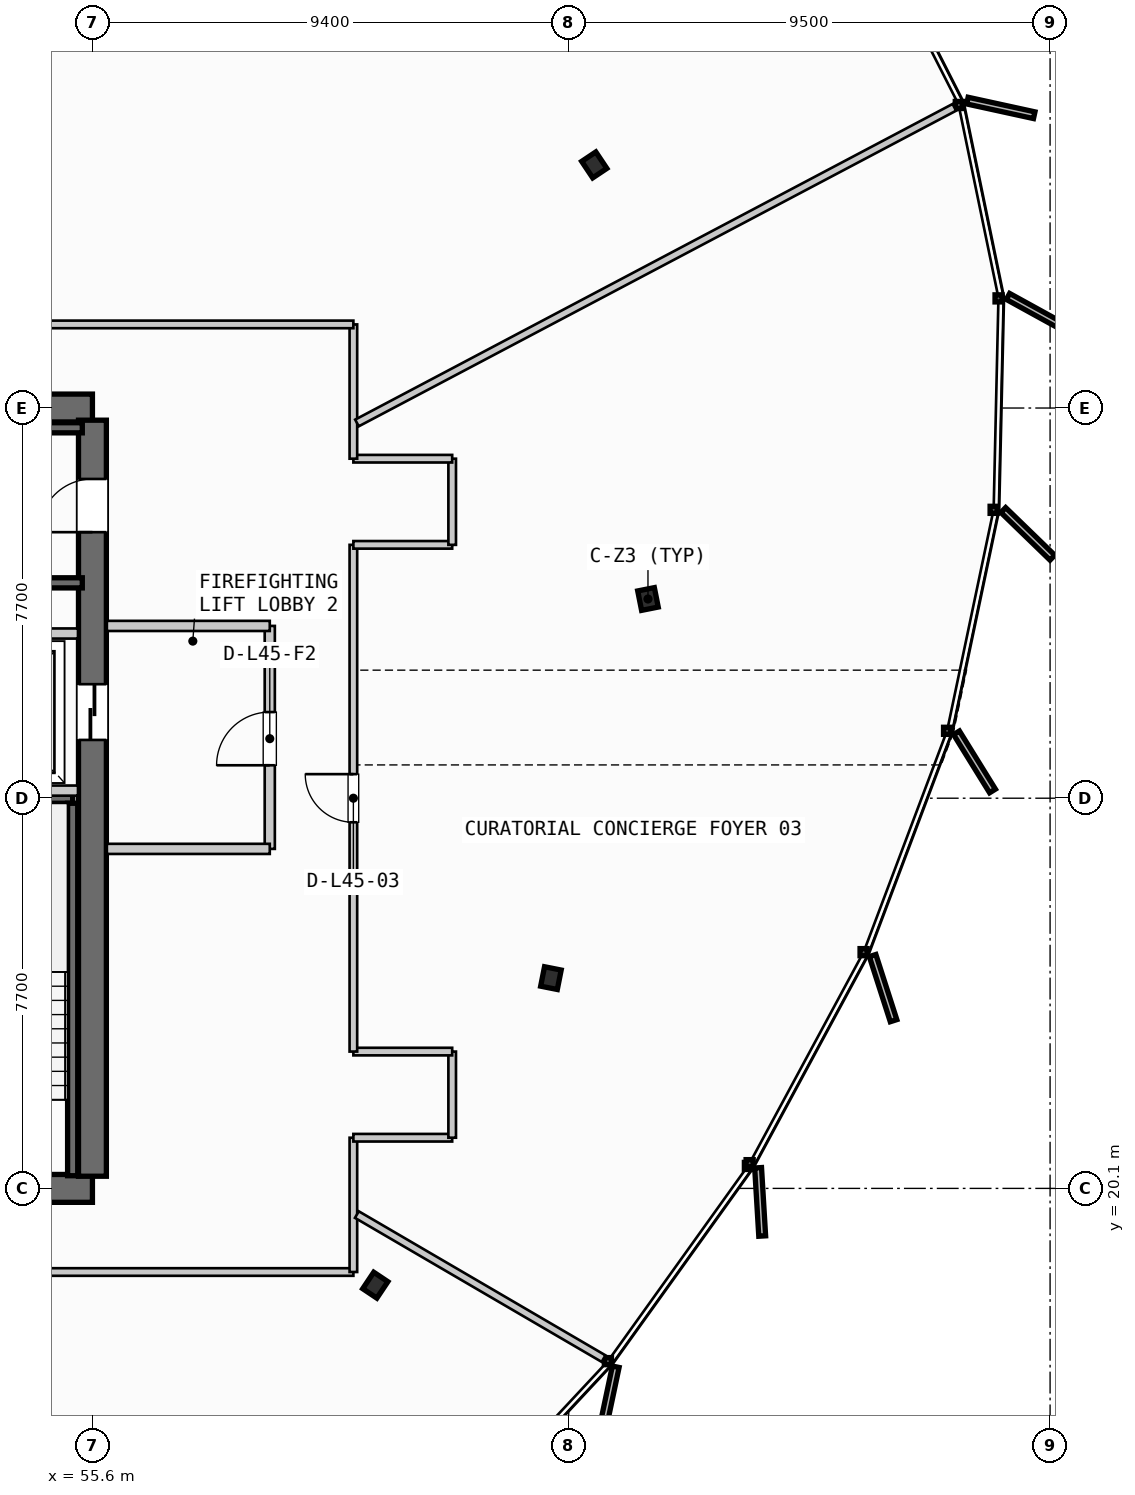
"""IFC4 building model, lengths in metres.
Left out: names, types, materials, properties, quantities, classifications, styles, units other than length and angle.
Written with IfcOpenShell. Run it as: python <this file> out.ifc"""

import sys

from ifc_helpers import new_model, si_unit, direction, frame, frame_2d, origin, origin_2d, place, context, subcontext, project, spatial, rectangle, i_section, extrude, source, transform, mapped, element, fill, save


model = new_model("IFC4")
c1 = context("Model", 3, precision=1e-05, world=origin(), true_north=direction((0.0, 1.0)))
c2 = subcontext(c1, "Body", "Model", "MODEL_VIEW")
j1 = project(units=[si_unit("LENGTHUNIT", "METRE"), si_unit("PLANEANGLEUNIT", "RADIAN")], contexts=[c1])
p1 = place(None, origin())
s1 = spatial("IfcSite", under=j1, at=p1, CompositionType="ELEMENT")
p2 = place(p1, origin())
s2 = spatial("IfcBuilding", under=s1, at=p2, CompositionType="ELEMENT")
p3 = place(p2, frame((0.0, 0.0, 176.4)))
s3 = spatial("IfcBuildingStorey", under=s2, at=p3, CompositionType="ELEMENT", Elevation=176.4)
p4 = place(p3, frame((38.0, 20.1, 0.0), z_axis=(0.0, 0.0, 1.0), x_axis=(1.0, 0.0, 0.0)))
e1 = element("IfcWall", 1, at=p4, inside=s3, PredefinedType="SHEAR", context=c2, shape_type="SweptSolid", body=[
    extrude(rectangle(XDim=17.6, YDim=0.55, at=frame_2d((8.8, 0.0))), origin(), (0.0, 0.0, 1.0), 3.26),
])
p5 = place(p4, frame((1.4, 0.0, 0.0)))
e2 = element("IfcOpeningElement", 2, at=p5, cuts=e1, PredefinedType="OPENING", context=c2, shape_type="SweptSolid", body=[
    extrude(rectangle(XDim=1.05, YDim=2.15, at=frame_2d((0.525, 1.075))), frame((0.0, 0.285, 0.0), z_axis=(0.0, -1.0, 0.0), x_axis=(1.0, 0.0, 0.0)), (0.0, 0.0, 1.0), 0.57),
])
p6 = place(p4, frame((15.15, 0.0, 0.0)))
e3 = element("IfcOpeningElement", 3, at=p6, cuts=e1, PredefinedType="OPENING", context=c2, shape_type="SweptSolid", body=[
    extrude(rectangle(XDim=1.05, YDim=2.15, at=frame_2d((0.525, 1.075))), frame((0.0, 0.285, 0.0), z_axis=(0.0, -1.0, 0.0), x_axis=(1.0, 0.0, 0.0)), (0.0, 0.0, 1.0), 0.57),
])
p7 = place(p4, frame((5.25, 0.0, 0.0)))
e4 = element("IfcOpeningElement", 4, at=p7, cuts=e1, PredefinedType="OPENING", context=c2, shape_type="SweptSolid", body=[
    extrude(rectangle(XDim=0.9, YDim=2.15, at=frame_2d((0.45, 1.075))), frame((0.0, 0.285, 0.0), z_axis=(0.0, -1.0, 0.0), x_axis=(1.0, 0.0, 0.0)), (0.0, 0.0, 1.0), 0.57),
])
p8 = place(p4, frame((11.4, 0.0, 0.0)))
e5 = element("IfcOpeningElement", 5, at=p8, cuts=e1, PredefinedType="OPENING", context=c2, shape_type="SweptSolid", body=[
    extrude(rectangle(XDim=0.95, YDim=2.15, at=frame_2d((0.475, 1.075))), frame((0.0, 0.285, 0.0), z_axis=(0.0, -1.0, 0.0), x_axis=(1.0, 0.0, 0.0)), (0.0, 0.0, 1.0), 0.57),
])
p9 = place(p3, frame((55.6, 35.5, 0.0), z_axis=(0.0, 0.0, 1.0), x_axis=(-1.0, 0.0, 0.0)))
e6 = element("IfcWall", 6, at=p9, inside=s3, PredefinedType="SHEAR", context=c2, shape_type="SweptSolid", body=[
    extrude(rectangle(XDim=17.6, YDim=0.55, at=frame_2d((8.8, 0.0))), origin(), (0.0, 0.0, 1.0), 3.26),
])
p10 = place(p9, frame((8.05, 0.0, 0.0)))
e7 = element("IfcOpeningElement", 7, at=p10, cuts=e6, PredefinedType="OPENING", context=c2, shape_type="SweptSolid", body=[
    extrude(rectangle(XDim=1.5, YDim=2.2, at=frame_2d((0.75, 1.1))), frame((0.0, 0.285, 0.0), z_axis=(0.0, -1.0, 0.0), x_axis=(1.0, 0.0, 0.0)), (0.0, 0.0, 1.0), 0.57),
])
p11 = place(p9, frame((15.1, 0.0, 0.0)))
e8 = element("IfcOpeningElement", 8, at=p11, cuts=e6, PredefinedType="OPENING", context=c2, shape_type="SweptSolid", body=[
    extrude(rectangle(XDim=0.95, YDim=2.15, at=frame_2d((0.475, 1.075))), frame((0.0, 0.285, 0.0), z_axis=(0.0, -1.0, 0.0), x_axis=(1.0, 0.0, 0.0)), (0.0, 0.0, 1.0), 0.57),
])
p12 = place(p9, frame((12.9, 0.0, 0.0)))
e9 = element("IfcOpeningElement", 9, at=p12, cuts=e6, PredefinedType="OPENING", context=c2, shape_type="SweptSolid", body=[
    extrude(rectangle(XDim=0.9, YDim=2.15, at=frame_2d((0.45, 1.075))), frame((0.0, 0.285, 0.0), z_axis=(0.0, -1.0, 0.0), x_axis=(1.0, 0.0, 0.0)), (0.0, 0.0, 1.0), 0.57),
])
p13 = place(p9, frame((10.6, 0.0, 0.0)))
e10 = element("IfcOpeningElement", 10, at=p13, cuts=e6, PredefinedType="OPENING", context=c2, shape_type="SweptSolid", body=[
    extrude(rectangle(XDim=0.95, YDim=2.15, at=frame_2d((0.475, 1.075))), frame((0.0, 0.285, 0.0), z_axis=(0.0, -1.0, 0.0), x_axis=(1.0, 0.0, 0.0)), (0.0, 0.0, 1.0), 0.57),
])
p14 = place(p3, frame((55.6, 20.34, 0.0), z_axis=(0.0, 0.0, 1.0), x_axis=(0.0, 1.0, 0.0)))
e11 = element("IfcWall", 11, at=p14, inside=s3, PredefinedType="SHEAR", context=c2, shape_type="SweptSolid", body=[
    extrude(rectangle(XDim=14.92, YDim=0.55, at=frame_2d((7.46, 0.0))), origin(), (0.0, 0.0, 1.0), 3.26),
])
p15 = place(p14, frame((12.71, 0.0, 0.0)))
e12 = element("IfcOpeningElement", 12, at=p15, cuts=e11, PredefinedType="OPENING", context=c2, shape_type="SweptSolid", body=[
    extrude(rectangle(XDim=1.05, YDim=2.15, at=frame_2d((0.525, 1.075))), frame((0.0, 0.285, 0.0), z_axis=(0.0, -1.0, 0.0), x_axis=(1.0, 0.0, 0.0)), (0.0, 0.0, 1.0), 0.57),
])
p16 = place(p14, frame((8.61, 0.0, 0.0)))
e13 = element("IfcOpeningElement", 13, at=p16, cuts=e11, PredefinedType="OPENING", context=c2, shape_type="SweptSolid", body=[
    extrude(rectangle(XDim=1.1, YDim=2.2, at=frame_2d((0.55, 1.1))), frame((0.0, 0.285, 0.0), z_axis=(0.0, -1.0, 0.0), x_axis=(1.0, 0.0, 0.0)), (0.0, 0.0, 1.0), 0.57),
])
m1 = source(origin(), c2, "Body", "SweptSolid", [
    extrude(i_section(OverallWidth=0.391, OverallDepth=0.335, WebThickness=0.023, FlangeThickness=0.034, FilletRadius=0.015, at=origin_2d()), origin(), (0.0, 0.0, 1.0), 3.26),
])
for number, where, z_axis, x_axis in (
    (14, (66.564, 31.731, 0.0), (0.0, 0.0, 1.0), (0.981, 0.195, 0.0)),
    (15, (65.504, 40.298, 0.0), (0.0, 0.0, 1.0), (0.831, 0.556, 0.0)),
    (16, (61.183, 18.19, 0.0), (0.0, 0.0, 1.0), (0.831, -0.556, 0.0)),
    (17, (64.649, 24.25, 0.0), (0.0, 0.0, 1.0), (0.981, -0.195, 0.0)),
):
    element("IfcColumn", number, at=place(p3, frame(where, z_axis=z_axis, x_axis=x_axis)), inside=s3, PredefinedType="COLUMN", context=c2, shape_type="MappedRepresentation", body=[
        mapped(m1, transform((0.0, 0.0, 0.0), scale=1.0)),
    ])
p17 = place(p3, frame((52.15, 27.8, 0.0), z_axis=(0.0, 0.0, 1.0), x_axis=(1.0, 0.0, 0.0)))
e18 = element("IfcWall", 18, at=p17, inside=s3, PredefinedType="SHEAR", context=c2, shape_type="SweptSolid", body=[
    extrude(rectangle(XDim=3.06, YDim=0.2, at=frame_2d((1.53, 0.0))), origin(), (0.0, 0.0, 1.0), 3.26),
])
for number, where, z_axis, x_axis in (
    (19, (55.21, 27.7, 0.0), (0.0, 0.0, 1.0), (0.0, -1.0, 0.0)),
    (20, (48.05, 35.11, 0.0), (0.0, 0.0, 1.0), (1.0, 0.0, 0.0)),
    (21, (55.4, 32.05, 0.0), (0.0, 0.0, 1.0), (-1.0, 0.0, 0.0)),
):
    element("IfcWall", number, at=place(p3, frame(where, z_axis=z_axis, x_axis=x_axis)), inside=s3, PredefinedType="SHEAR", context=c2, shape_type="SweptSolid", body=[
        extrude(rectangle(XDim=7.35, YDim=0.2, at=frame_2d((3.675, 0.0))), origin(), (0.0, 0.0, 1.0), 3.26),
    ])
for number, where, z_axis, x_axis in (
    (22, (52.45, 27.95, 0.0), (0.0, 0.0, 1.0), (1.0, 0.0, 0.0)),
    (23, (52.45, 31.05, 0.0), (0.0, 0.0, 1.0), (1.0, 0.0, 0.0)),
):
    element("IfcWall", number, at=place(p3, frame(where, z_axis=z_axis, x_axis=x_axis)), inside=s3, PredefinedType="PARTITIONING", context=c2, shape_type="SweptSolid", body=[
        extrude(rectangle(XDim=2.865, YDim=0.2, at=frame_2d((1.433, 0.0))), origin(), (0.0, 0.0, 1.0), 2.28),
    ])
p18 = place(p3, frame((59.1, 26.8, 0.0), z_axis=(0.0, 0.0, 1.0), x_axis=(0.0, 1.0, 0.0)))
e24 = element("IfcWall", 24, at=p18, inside=s3, PredefinedType="PARTITIONING", context=c2, shape_type="SweptSolid", body=[
    extrude(rectangle(XDim=4.4, YDim=0.2, at=frame_2d((2.2, 0.0))), origin(), (0.0, 0.0, 1.0), 2.28),
])
p19 = place(p18, frame((1.65, 0.0, 0.0)))
e25 = element("IfcOpeningElement", 25, at=p19, cuts=e24, PredefinedType="OPENING", context=c2, shape_type="SweptSolid", body=[
    extrude(rectangle(XDim=1.05, YDim=2.15, at=frame_2d((0.525, 1.075))), frame((0.0, 0.11, 0.0), z_axis=(0.0, -1.0, 0.0), x_axis=(1.0, 0.0, 0.0)), (0.0, 0.0, 1.0), 0.22),
])
for number, where, z_axis, x_axis in (
    (26, (55.885, 26.8, 0.0), (0.0, 0.0, 1.0), (1.0, 0.0, 0.0)),
    (27, (55.885, 31.2, 0.0), (0.0, 0.0, 1.0), (1.0, 0.0, 0.0)),
):
    element("IfcWall", number, at=place(p3, frame(where, z_axis=z_axis, x_axis=x_axis)), inside=s3, PredefinedType="PARTITIONING", context=c2, shape_type="SweptSolid", body=[
        extrude(rectangle(XDim=3.215, YDim=0.2, at=frame_2d((1.607, 0.0))), origin(), (0.0, 0.0, 1.0), 2.28),
    ])
p20 = place(p3, frame((32.4, 18.45, 0.0), z_axis=(0.0, 0.0, 1.0), x_axis=(1.0, 0.0, 0.0)))
e28 = element("IfcWall", 28, at=p20, inside=s3, PredefinedType="PARTITIONING", context=c2, shape_type="SweptSolid", body=[
    extrude(rectangle(XDim=28.35, YDim=0.15, at=frame_2d((14.175, 0.0))), origin(), (0.0, 0.0, 1.0), 2.28),
])
p21 = place(p20, frame((5.278, 0.0, 0.0)))
e29 = element("IfcOpeningElement", 29, at=p21, cuts=e28, PredefinedType="OPENING", context=c2, shape_type="SweptSolid", body=[
    extrude(rectangle(XDim=0.95, YDim=2.15, at=frame_2d((0.475, 1.075))), frame((0.0, 0.085, 0.0), z_axis=(0.0, -1.0, 0.0), x_axis=(1.0, 0.0, 0.0)), (0.0, 0.0, 1.0), 0.17),
])
p22 = place(p20, frame((18.864, 0.0, 0.0)))
e30 = element("IfcOpeningElement", 30, at=p22, cuts=e28, PredefinedType="OPENING", context=c2, shape_type="SweptSolid", body=[
    extrude(rectangle(XDim=0.95, YDim=2.15, at=frame_2d((0.475, 1.075))), frame((0.0, 0.085, 0.0), z_axis=(0.0, -1.0, 0.0), x_axis=(1.0, 0.0, 0.0)), (0.0, 0.0, 1.0), 0.17),
])
p23 = place(p3, frame((60.75, 18.45, 0.0), z_axis=(0.0, 0.0, 1.0), x_axis=(0.0, 1.0, 0.0)))
e31 = element("IfcWall", 31, at=p23, inside=s3, PredefinedType="PARTITIONING", context=c2, shape_type="SweptSolid", body=[
    extrude(rectangle(XDim=2.65, YDim=0.15, at=frame_2d((1.325, 0.0))), origin(), (0.0, 0.0, 1.0), 2.28),
])
p24 = place(p3, frame((60.75, 21.1, 0.0), z_axis=(0.0, 0.0, 1.0), x_axis=(1.0, 0.0, 0.0)))
e32 = element("IfcWall", 32, at=p24, inside=s3, PredefinedType="PARTITIONING", context=c2, shape_type="SweptSolid", body=[
    extrude(rectangle(XDim=1.95, YDim=0.15, at=frame_2d((0.975, 0.0))), origin(), (0.0, 0.0, 1.0), 2.28),
])
p25 = place(p3, frame((62.7, 21.1, 0.0), z_axis=(0.0, 0.0, 1.0), x_axis=(0.0, 1.0, 0.0)))
e33 = element("IfcWall", 33, at=p25, inside=s3, PredefinedType="PARTITIONING", context=c2, shape_type="SweptSolid", body=[
    extrude(rectangle(XDim=1.7, YDim=0.15, at=frame_2d((0.85, 0.0))), origin(), (0.0, 0.0, 1.0), 2.28),
])
p26 = place(p3, frame((62.7, 22.8, 0.0), z_axis=(0.0, 0.0, 1.0), x_axis=(-1.0, 0.0, 0.0)))
e34 = element("IfcWall", 34, at=p26, inside=s3, PredefinedType="PARTITIONING", context=c2, shape_type="SweptSolid", body=[
    extrude(rectangle(XDim=1.95, YDim=0.15, at=frame_2d((0.975, 0.0))), origin(), (0.0, 0.0, 1.0), 2.28),
])
p27 = place(p3, frame((60.75, 22.8, 0.0), z_axis=(0.0, 0.0, 1.0), x_axis=(0.0, 1.0, 0.0)))
e35 = element("IfcWall", 35, at=p27, inside=s3, PredefinedType="PARTITIONING", context=c2, shape_type="SweptSolid", body=[
    extrude(rectangle(XDim=10.0, YDim=0.15, at=frame_2d((5.0, 0.0))), origin(), (0.0, 0.0, 1.0), 2.28),
])
p28 = place(p27, frame((4.525, 0.0, 0.0)))
e36 = element("IfcOpeningElement", 36, at=p28, cuts=e35, PredefinedType="OPENING", context=c2, shape_type="SweptSolid", body=[
    extrude(rectangle(XDim=0.95, YDim=2.15, at=frame_2d((0.475, 1.075))), frame((0.0, 0.085, 0.0), z_axis=(0.0, -1.0, 0.0), x_axis=(1.0, 0.0, 0.0)), (0.0, 0.0, 1.0), 0.17),
])
p29 = place(p3, frame((60.75, 32.8, 0.0), z_axis=(0.0, 0.0, 1.0), x_axis=(1.0, 0.0, 0.0)))
e37 = element("IfcWall", 37, at=p29, inside=s3, PredefinedType="PARTITIONING", context=c2, shape_type="SweptSolid", body=[
    extrude(rectangle(XDim=1.95, YDim=0.15, at=frame_2d((0.975, 0.0))), origin(), (0.0, 0.0, 1.0), 2.28),
])
p30 = place(p3, frame((62.7, 32.8, 0.0), z_axis=(0.0, 0.0, 1.0), x_axis=(0.0, 1.0, 0.0)))
e38 = element("IfcWall", 38, at=p30, inside=s3, PredefinedType="PARTITIONING", context=c2, shape_type="SweptSolid", body=[
    extrude(rectangle(XDim=1.7, YDim=0.15, at=frame_2d((0.85, 0.0))), origin(), (0.0, 0.0, 1.0), 2.28),
])
p31 = place(p3, frame((62.7, 34.5, 0.0), z_axis=(0.0, 0.0, 1.0), x_axis=(-1.0, 0.0, 0.0)))
e39 = element("IfcWall", 39, at=p31, inside=s3, PredefinedType="PARTITIONING", context=c2, shape_type="SweptSolid", body=[
    extrude(rectangle(XDim=1.95, YDim=0.15, at=frame_2d((0.975, 0.0))), origin(), (0.0, 0.0, 1.0), 2.28),
])
p32 = place(p3, frame((60.75, 34.5, 0.0), z_axis=(0.0, 0.0, 1.0), x_axis=(0.0, 1.0, 0.0)))
e40 = element("IfcWall", 40, at=p32, inside=s3, PredefinedType="PARTITIONING", context=c2, shape_type="SweptSolid", body=[
    extrude(rectangle(XDim=2.65, YDim=0.15, at=frame_2d((1.325, 0.0))), origin(), (0.0, 0.0, 1.0), 2.28),
])
p33 = place(p3, frame((60.75, 37.15, 0.0), z_axis=(0.0, 0.0, 1.0), x_axis=(-1.0, 0.0, 0.0)))
e41 = element("IfcWall", 41, at=p33, inside=s3, PredefinedType="PARTITIONING", context=c2, shape_type="SweptSolid", body=[
    extrude(rectangle(XDim=28.35, YDim=0.15, at=frame_2d((14.175, 0.0))), origin(), (0.0, 0.0, 1.0), 2.28),
])
p34 = place(p33, frame((11.912, 0.0, 0.0)))
e42 = element("IfcOpeningElement", 42, at=p34, cuts=e41, PredefinedType="OPENING", context=c2, shape_type="SweptSolid", body=[
    extrude(rectangle(XDim=0.95, YDim=2.15, at=frame_2d((0.475, 1.075))), frame((0.0, 0.085, 0.0), z_axis=(0.0, -1.0, 0.0), x_axis=(1.0, 0.0, 0.0)), (0.0, 0.0, 1.0), 0.17),
])
p35 = place(p3, frame((60.819, 19.583, 0.0), z_axis=(0.0, 0.0, 1.0), x_axis=(0.86359190548, -0.504191452515, 0.0)))
e43 = element("IfcWall", 43, at=p35, inside=s3, PredefinedType="PARTITIONING", context=c2, shape_type="SweptSolid", body=[
    extrude(rectangle(XDim=5.637, YDim=0.15, at=frame_2d((2.818, 0.0))), origin(), (0.0, 0.0, 1.0), 2.28),
])
p36 = place(p3, frame((60.821, 35.205, 0.0), z_axis=(0.0, 0.0, 1.0), x_axis=(0.884187105587, 0.467132917181, 0.0)))
e44 = element("IfcWall", 44, at=p36, inside=s3, PredefinedType="PARTITIONING", context=c2, shape_type="SweptSolid", body=[
    extrude(rectangle(XDim=13.333, YDim=0.15, at=frame_2d((6.667, 0.0))), origin(), (0.0, 0.0, 1.0), 2.28),
])
m2 = source(origin(), c2, "Body", "SweptSolid", [
    extrude(rectangle(XDim=1.05, YDim=2.15, at=frame_2d((0.525, 1.075))), frame((0.0, 0.025, 0.0), z_axis=(0.0, -1.0, 0.0), x_axis=(1.0, 0.0, 0.0)), (0.0, 0.0, 1.0), 0.05),
])
p37 = place(p15, origin())
e45 = element("IfcDoor", 45, at=p37, inside=s3, OperationType="SINGLE_SWING_LEFT", PredefinedType="DOOR", context=c2, shape_type="MappedRepresentation", body=[
    mapped(m2, transform((0.0, 0.0, 0.0), scale=1.0)),
])
fill(e12, e45)
m3 = source(origin(), c2, "Body", "SweptSolid", [
    extrude(rectangle(XDim=1.1, YDim=2.2, at=frame_2d((0.55, 1.1))), frame((0.0, 0.025, 0.0), z_axis=(0.0, -1.0, 0.0), x_axis=(1.0, 0.0, 0.0)), (0.0, 0.0, 1.0), 0.05),
])
p38 = place(p16, origin())
e46 = element("IfcDoor", 46, at=p38, inside=s3, OperationType="SLIDING_TO_RIGHT", PredefinedType="DOOR", context=c2, shape_type="MappedRepresentation", body=[
    mapped(m3, transform((0.0, 0.0, 0.0), scale=1.0)),
])
fill(e13, e46)
p39 = place(p19, origin())
e47 = element("IfcDoor", 47, at=p39, inside=s3, OperationType="SINGLE_SWING_LEFT", PredefinedType="DOOR", context=c2, shape_type="MappedRepresentation", body=[
    mapped(m2, transform((0.0, 0.0, 0.0), scale=1.0)),
])
fill(e25, e47)
m4 = source(origin(), c2, "Body", "SweptSolid", [
    extrude(rectangle(XDim=0.95, YDim=2.15, at=frame_2d((0.475, 1.075))), frame((0.0, 0.025, 0.0), z_axis=(0.0, -1.0, 0.0), x_axis=(1.0, 0.0, 0.0)), (0.0, 0.0, 1.0), 0.05),
])
p40 = place(p28, origin())
e48 = element("IfcDoor", 48, at=p40, inside=s3, OperationType="SINGLE_SWING_RIGHT", PredefinedType="DOOR", context=c2, shape_type="MappedRepresentation", body=[
    mapped(m4, transform((0.0, 0.0, 0.0), scale=1.0)),
])
fill(e36, e48)
save(model, sys.argv[1])
